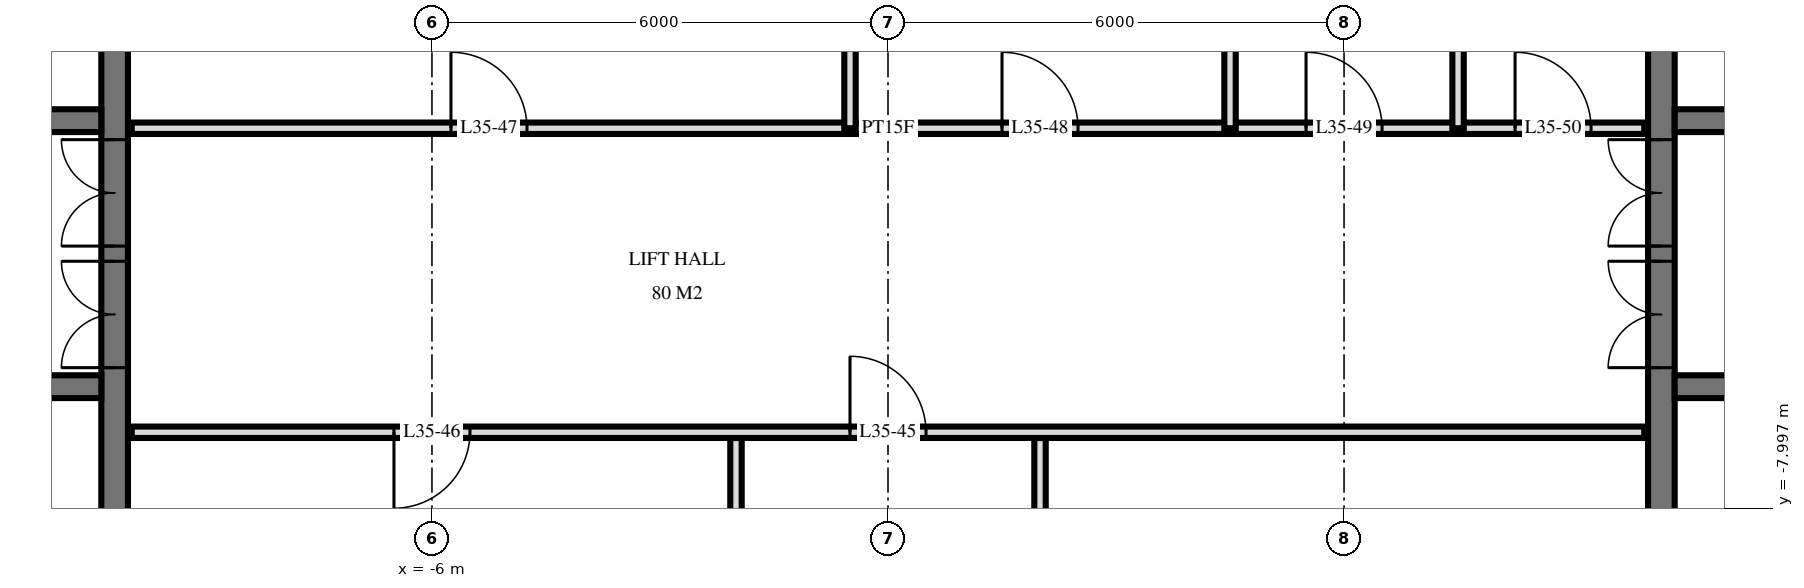
"""IFC4 building model, lengths in metres.
Left out: names, types, materials, properties, quantities, classifications, styles, units other than length and angle.
Written with IfcOpenShell. Run it as: python <this file> out.ifc"""

import sys

from ifc_helpers import new_model, si_unit, direction, frame, frame_2d, origin, place, context, subcontext, project, spatial, rectangle, extrude, element, fill, save


model = new_model("IFC4")
c1 = context("Model", 3, precision=1e-05, world=origin(), true_north=direction((0.0, 1.0)))
c2 = subcontext(c1, "Body", "Model", "MODEL_VIEW")
j1 = project(units=[si_unit("LENGTHUNIT", "METRE"), si_unit("PLANEANGLEUNIT", "RADIAN")], contexts=[c1])
p1 = place(None, origin())
s1 = spatial("IfcSite", under=j1, at=p1, CompositionType="ELEMENT")
p2 = place(p1, origin())
s2 = spatial("IfcBuilding", under=s1, at=p2, CompositionType="ELEMENT")
p3 = place(p2, frame((0.0, 0.0, 138.0)))
s3 = spatial("IfcBuildingStorey", under=s2, at=p3, CompositionType="ELEMENT", Elevation=138.0)
p4 = place(p3, frame((-10.175, -14.55, 0.0), z_axis=(0.0, 0.0, 1.0), x_axis=(0.0, 1.0, 0.0)))
e1 = element("IfcWall", 1, at=p4, inside=s3, PredefinedType="SHEAR", context=c2, shape_type="SweptSolid", body=[
    extrude(rectangle(XDim=14.1, YDim=0.35, at=frame_2d((7.05, 0.0))), origin(), (0.0, 0.0, 1.0), 3.6),
])
p5 = place(p4, frame((8.4, 0.0, 0.0)))
e2 = element("IfcOpeningElement", 2, at=p5, cuts=e1, PredefinedType="OPENING", context=c2, shape_type="SweptSolid", body=[
    extrude(rectangle(XDim=1.4, YDim=2.4, at=frame_2d((0.7, 1.2))), frame((0.0, 0.185, 0.0), z_axis=(0.0, -1.0, 0.0), x_axis=(1.0, 0.0, 0.0)), (0.0, 0.0, 1.0), 0.37),
])
p6 = place(p4, frame((10.0, 0.0, 0.0)))
e3 = element("IfcOpeningElement", 3, at=p6, cuts=e1, PredefinedType="OPENING", context=c2, shape_type="SweptSolid", body=[
    extrude(rectangle(XDim=1.4, YDim=2.4, at=frame_2d((0.7, 1.2))), frame((0.0, 0.185, 0.0), z_axis=(0.0, -1.0, 0.0), x_axis=(1.0, 0.0, 0.0)), (0.0, 0.0, 1.0), 0.37),
])
p7 = place(p4, frame((4.0, 0.0, 0.0)))
e4 = element("IfcOpeningElement", 4, at=p7, cuts=e1, PredefinedType="OPENING", context=c2, shape_type="SweptSolid", body=[
    extrude(rectangle(XDim=1.2, YDim=2.1, at=frame_2d((0.6, 1.05))), frame((0.0, 0.185, 0.0), z_axis=(0.0, -1.0, 0.0), x_axis=(1.0, 0.0, 0.0)), (0.0, 0.0, 1.0), 0.37),
])
p8 = place(p3, frame((-24.05, -2.9, 0.0), z_axis=(0.0, 0.0, 1.0), x_axis=(1.0, 0.0, 0.0)))
e5 = element("IfcWall", 5, at=p8, inside=s3, PredefinedType="SHEAR", context=c2, shape_type="SweptSolid", body=[
    extrude(rectangle(XDim=13.7, YDim=0.3, at=frame_2d((6.85, 0.0))), origin(), (0.0, 0.0, 1.0), 3.6),
])
p9 = place(p8, frame((0.55, 0.0, 0.0)))
e6 = element("IfcOpeningElement", 6, at=p9, cuts=e5, PredefinedType="OPENING", context=c2, shape_type="SweptSolid", body=[
    extrude(rectangle(XDim=1.1, YDim=2.1, at=frame_2d((0.55, 1.05))), frame((0.0, 0.16, 0.0), z_axis=(0.0, -1.0, 0.0), x_axis=(1.0, 0.0, 0.0)), (0.0, 0.0, 1.0), 0.32),
])
p10 = place(p8, frame((5.9, 0.0, 0.0)))
e7 = element("IfcOpeningElement", 7, at=p10, cuts=e5, PredefinedType="OPENING", context=c2, shape_type="SweptSolid", body=[
    extrude(rectangle(XDim=0.9, YDim=2.1, at=frame_2d((0.45, 1.05))), frame((0.0, 0.16, 0.0), z_axis=(0.0, -1.0, 0.0), x_axis=(1.0, 0.0, 0.0)), (0.0, 0.0, 1.0), 0.32),
])
p11 = place(p8, frame((11.85, 0.0, 0.0)))
e8 = element("IfcOpeningElement", 8, at=p11, cuts=e5, PredefinedType="OPENING", context=c2, shape_type="SweptSolid", body=[
    extrude(rectangle(XDim=1.0, YDim=2.1, at=frame_2d((0.5, 1.05))), frame((0.0, 0.16, 0.0), z_axis=(0.0, -1.0, 0.0), x_axis=(1.0, 0.0, 0.0)), (0.0, 0.0, 1.0), 0.32),
])
p12 = place(p8, frame((9.312, 0.0, 0.0)))
e9 = element("IfcOpeningElement", 9, at=p12, cuts=e5, PredefinedType="OPENING", context=c2, shape_type="SweptSolid", body=[
    extrude(rectangle(XDim=1.0, YDim=2.1, at=frame_2d((0.5, 1.05))), frame((0.0, 0.16, 0.0), z_axis=(0.0, -1.0, 0.0), x_axis=(1.0, 0.0, 0.0)), (0.0, 0.0, 1.0), 0.32),
])
p13 = place(p8, frame((7.887, 0.0, 0.0)))
e10 = element("IfcOpeningElement", 10, at=p13, cuts=e5, PredefinedType="OPENING", context=c2, shape_type="SweptSolid", body=[
    extrude(rectangle(XDim=1.0, YDim=2.1, at=frame_2d((0.5, 1.05))), frame((0.0, 0.16, 0.0), z_axis=(0.0, -1.0, 0.0), x_axis=(1.0, 0.0, 0.0)), (0.0, 0.0, 1.0), 0.32),
])
p14 = place(p8, frame((3.0, 0.0, 0.0)))
e11 = element("IfcOpeningElement", 11, at=p14, cuts=e5, PredefinedType="OPENING", context=c2, shape_type="SweptSolid", body=[
    extrude(rectangle(XDim=1.0, YDim=2.1, at=frame_2d((0.5, 1.05))), frame((0.0, 0.16, 0.0), z_axis=(0.0, -1.0, 0.0), x_axis=(1.0, 0.0, 0.0)), (0.0, 0.0, 1.0), 0.32),
])
p15 = place(p3, frame((-24.05, -6.4, 0.0), z_axis=(0.0, 0.0, 1.0), x_axis=(1.0, 0.0, 0.0)))
e12 = element("IfcWall", 12, at=p15, inside=s3, PredefinedType="SHEAR", context=c2, shape_type="SweptSolid", body=[
    extrude(rectangle(XDim=13.7, YDim=0.3, at=frame_2d((6.85, 0.0))), origin(), (0.0, 0.0, 1.0), 3.6),
])
p16 = place(p15, frame((0.55, 0.0, 0.0)))
e13 = element("IfcOpeningElement", 13, at=p16, cuts=e12, PredefinedType="OPENING", context=c2, shape_type="SweptSolid", body=[
    extrude(rectangle(XDim=1.1, YDim=2.1, at=frame_2d((0.55, 1.05))), frame((0.0, 0.16, 0.0), z_axis=(0.0, -1.0, 0.0), x_axis=(1.0, 0.0, 0.0)), (0.0, 0.0, 1.0), 0.32),
])
p17 = place(p15, frame((5.8, 0.0, 0.0)))
e14 = element("IfcOpeningElement", 14, at=p17, cuts=e12, PredefinedType="OPENING", context=c2, shape_type="SweptSolid", body=[
    extrude(rectangle(XDim=1.1, YDim=2.1, at=frame_2d((0.55, 1.05))), frame((0.0, 0.16, 0.0), z_axis=(0.0, -1.0, 0.0), x_axis=(1.0, 0.0, 0.0)), (0.0, 0.0, 1.0), 0.32),
])
p18 = place(p3, frame((10.175, -14.55, 0.0), z_axis=(0.0, 0.0, 1.0), x_axis=(0.0, 1.0, 0.0)))
e15 = element("IfcWall", 15, at=p18, inside=s3, PredefinedType="SHEAR", context=c2, shape_type="SweptSolid", body=[
    extrude(rectangle(XDim=14.1, YDim=0.35, at=frame_2d((7.05, 0.0))), origin(), (0.0, 0.0, 1.0), 3.6),
])
p19 = place(p18, frame((8.4, 0.0, 0.0)))
e16 = element("IfcOpeningElement", 16, at=p19, cuts=e15, PredefinedType="OPENING", context=c2, shape_type="SweptSolid", body=[
    extrude(rectangle(XDim=1.4, YDim=2.4, at=frame_2d((0.7, 1.2))), frame((0.0, 0.185, 0.0), z_axis=(0.0, -1.0, 0.0), x_axis=(1.0, 0.0, 0.0)), (0.0, 0.0, 1.0), 0.37),
])
p20 = place(p18, frame((10.0, 0.0, 0.0)))
e17 = element("IfcOpeningElement", 17, at=p20, cuts=e15, PredefinedType="OPENING", context=c2, shape_type="SweptSolid", body=[
    extrude(rectangle(XDim=1.4, YDim=2.4, at=frame_2d((0.7, 1.2))), frame((0.0, 0.185, 0.0), z_axis=(0.0, -1.0, 0.0), x_axis=(1.0, 0.0, 0.0)), (0.0, 0.0, 1.0), 0.37),
])
p21 = place(p18, frame((4.0, 0.0, 0.0)))
e18 = element("IfcOpeningElement", 18, at=p21, cuts=e15, PredefinedType="OPENING", context=c2, shape_type="SweptSolid", body=[
    extrude(rectangle(XDim=1.2, YDim=2.1, at=frame_2d((0.6, 1.05))), frame((0.0, 0.185, 0.0), z_axis=(0.0, -1.0, 0.0), x_axis=(1.0, 0.0, 0.0)), (0.0, 0.0, 1.0), 0.37),
])
p22 = place(p3, frame((10.35, -2.9, 0.0), z_axis=(0.0, 0.0, 1.0), x_axis=(1.0, 0.0, 0.0)))
e19 = element("IfcWall", 19, at=p22, inside=s3, PredefinedType="SHEAR", context=c2, shape_type="SweptSolid", body=[
    extrude(rectangle(XDim=13.7, YDim=0.3, at=frame_2d((6.85, 0.0))), origin(), (0.0, 0.0, 1.0), 3.6),
])
p23 = place(p22, frame((12.05, 0.0, 0.0)))
e20 = element("IfcOpeningElement", 20, at=p23, cuts=e19, PredefinedType="OPENING", context=c2, shape_type="SweptSolid", body=[
    extrude(rectangle(XDim=1.1, YDim=2.1, at=frame_2d((0.55, 1.05))), frame((0.0, 0.16, 0.0), z_axis=(0.0, -1.0, 0.0), x_axis=(1.0, 0.0, 0.0)), (0.0, 0.0, 1.0), 0.32),
])
p24 = place(p22, frame((6.9, 0.0, 0.0)))
e21 = element("IfcOpeningElement", 21, at=p24, cuts=e19, PredefinedType="OPENING", context=c2, shape_type="SweptSolid", body=[
    extrude(rectangle(XDim=0.9, YDim=2.1, at=frame_2d((0.45, 1.05))), frame((0.0, 0.16, 0.0), z_axis=(0.0, -1.0, 0.0), x_axis=(1.0, 0.0, 0.0)), (0.0, 0.0, 1.0), 0.32),
])
p25 = place(p22, frame((0.85, 0.0, 0.0)))
e22 = element("IfcOpeningElement", 22, at=p25, cuts=e19, PredefinedType="OPENING", context=c2, shape_type="SweptSolid", body=[
    extrude(rectangle(XDim=1.0, YDim=2.1, at=frame_2d((0.5, 1.05))), frame((0.0, 0.16, 0.0), z_axis=(0.0, -1.0, 0.0), x_axis=(1.0, 0.0, 0.0)), (0.0, 0.0, 1.0), 0.32),
])
p26 = place(p22, frame((3.387, 0.0, 0.0)))
e23 = element("IfcOpeningElement", 23, at=p26, cuts=e19, PredefinedType="OPENING", context=c2, shape_type="SweptSolid", body=[
    extrude(rectangle(XDim=1.0, YDim=2.1, at=frame_2d((0.5, 1.05))), frame((0.0, 0.16, 0.0), z_axis=(0.0, -1.0, 0.0), x_axis=(1.0, 0.0, 0.0)), (0.0, 0.0, 1.0), 0.32),
])
p27 = place(p22, frame((4.812, 0.0, 0.0)))
e24 = element("IfcOpeningElement", 24, at=p27, cuts=e19, PredefinedType="OPENING", context=c2, shape_type="SweptSolid", body=[
    extrude(rectangle(XDim=1.0, YDim=2.1, at=frame_2d((0.5, 1.05))), frame((0.0, 0.16, 0.0), z_axis=(0.0, -1.0, 0.0), x_axis=(1.0, 0.0, 0.0)), (0.0, 0.0, 1.0), 0.32),
])
p28 = place(p22, frame((9.7, 0.0, 0.0)))
e25 = element("IfcOpeningElement", 25, at=p28, cuts=e19, PredefinedType="OPENING", context=c2, shape_type="SweptSolid", body=[
    extrude(rectangle(XDim=1.0, YDim=2.1, at=frame_2d((0.5, 1.05))), frame((0.0, 0.16, 0.0), z_axis=(0.0, -1.0, 0.0), x_axis=(1.0, 0.0, 0.0)), (0.0, 0.0, 1.0), 0.32),
])
p29 = place(p3, frame((10.35, -6.4, 0.0), z_axis=(0.0, 0.0, 1.0), x_axis=(1.0, 0.0, 0.0)))
e26 = element("IfcWall", 26, at=p29, inside=s3, PredefinedType="SHEAR", context=c2, shape_type="SweptSolid", body=[
    extrude(rectangle(XDim=13.7, YDim=0.3, at=frame_2d((6.85, 0.0))), origin(), (0.0, 0.0, 1.0), 3.6),
])
p30 = place(p29, frame((12.05, 0.0, 0.0)))
e27 = element("IfcOpeningElement", 27, at=p30, cuts=e26, PredefinedType="OPENING", context=c2, shape_type="SweptSolid", body=[
    extrude(rectangle(XDim=1.1, YDim=2.1, at=frame_2d((0.55, 1.05))), frame((0.0, 0.16, 0.0), z_axis=(0.0, -1.0, 0.0), x_axis=(1.0, 0.0, 0.0)), (0.0, 0.0, 1.0), 0.32),
])
p31 = place(p29, frame((6.8, 0.0, 0.0)))
e28 = element("IfcOpeningElement", 28, at=p31, cuts=e26, PredefinedType="OPENING", context=c2, shape_type="SweptSolid", body=[
    extrude(rectangle(XDim=1.1, YDim=2.1, at=frame_2d((0.55, 1.05))), frame((0.0, 0.16, 0.0), z_axis=(0.0, -1.0, 0.0), x_axis=(1.0, 0.0, 0.0)), (0.0, 0.0, 1.0), 0.32),
])
for number, where, z_axis, x_axis in (
    (29, (7.5, -3.0, 0.0), (0.0, 0.0, 1.0), (0.0, 1.0, 0.0)),
    (30, (4.5, -3.0, 0.0), (0.0, 0.0, 1.0), (0.0, 1.0, 0.0)),
):
    element("IfcWall", number, at=place(p3, frame(where, z_axis=z_axis, x_axis=x_axis)), inside=s3, PredefinedType="PLUMBINGWALL", context=c2, shape_type="SweptSolid", body=[
        extrude(rectangle(XDim=4.02, YDim=0.15, at=frame_2d((2.01, 0.0))), origin(), (0.0, 0.0, 1.0), 3.32),
    ])
p32 = place(p3, frame((2.0, -11.0, 0.0), z_axis=(0.0, 0.0, 1.0), x_axis=(0.0, 1.0, 0.0)))
e31 = element("IfcWall", 31, at=p32, inside=s3, PredefinedType="PARTITIONING", context=c2, shape_type="SweptSolid", body=[
    extrude(rectangle(XDim=4.0, YDim=0.15, at=frame_2d((2.0, 0.0))), origin(), (0.0, 0.0, 1.0), 3.32),
])
p33 = place(p3, frame((-0.5, -3.0, 0.0), z_axis=(0.0, 0.0, 1.0), x_axis=(0.0, 1.0, 0.0)))
e32 = element("IfcWall", 32, at=p33, inside=s3, PredefinedType="PARTITIONING", context=c2, shape_type="SweptSolid", body=[
    extrude(rectangle(XDim=4.02, YDim=0.15, at=frame_2d((2.01, 0.0))), origin(), (0.0, 0.0, 1.0), 3.32),
])
p34 = place(p3, frame((-2.0, -11.0, 0.0), z_axis=(0.0, 0.0, 1.0), x_axis=(0.0, 1.0, 0.0)))
e33 = element("IfcWall", 33, at=p34, inside=s3, PredefinedType="PARTITIONING", context=c2, shape_type="SweptSolid", body=[
    extrude(rectangle(XDim=4.0, YDim=0.15, at=frame_2d((2.0, 0.0))), origin(), (0.0, 0.0, 1.0), 3.32),
])
p35 = place(p3, frame((-9.95, -7.0, 0.0), z_axis=(0.0, 0.0, 1.0), x_axis=(1.0, 0.0, 0.0)))
e34 = element("IfcWall", 34, at=p35, inside=s3, PredefinedType="PARTITIONING", context=c2, shape_type="SweptSolid", body=[
    extrude(rectangle(XDim=19.9, YDim=0.15, at=frame_2d((9.95, 0.0))), origin(), (0.0, 0.0, 1.0), 3.32),
])
p36 = place(p35, frame((9.45, 0.0, 0.0)))
e35 = element("IfcOpeningElement", 35, at=p36, cuts=e34, PredefinedType="OPENING", context=c2, shape_type="SweptSolid", body=[
    extrude(rectangle(XDim=1.0, YDim=2.1, at=frame_2d((0.5, 1.05))), frame((0.0, 0.085, 0.0), z_axis=(0.0, -1.0, 0.0), x_axis=(1.0, 0.0, 0.0)), (0.0, 0.0, 1.0), 0.17),
])
p37 = place(p35, frame((3.45, 0.0, 0.0)))
e36 = element("IfcOpeningElement", 36, at=p37, cuts=e34, PredefinedType="OPENING", context=c2, shape_type="SweptSolid", body=[
    extrude(rectangle(XDim=1.0, YDim=2.1, at=frame_2d((0.5, 1.05))), frame((0.0, 0.085, 0.0), z_axis=(0.0, -1.0, 0.0), x_axis=(1.0, 0.0, 0.0)), (0.0, 0.0, 1.0), 0.17),
])
p38 = place(p3, frame((-9.95, -3.0, 0.0), z_axis=(0.0, 0.0, 1.0), x_axis=(1.0, 0.0, 0.0)))
e37 = element("IfcWall", 37, at=p38, inside=s3, PredefinedType="PARTITIONING", context=c2, shape_type="SweptSolid", body=[
    extrude(rectangle(XDim=19.9, YDim=0.15, at=frame_2d((9.95, 0.0))), origin(), (0.0, 0.0, 1.0), 3.32),
])
p39 = place(p38, frame((4.2, 0.0, 0.0)))
e38 = element("IfcOpeningElement", 38, at=p39, cuts=e37, PredefinedType="OPENING", context=c2, shape_type="SweptSolid", body=[
    extrude(rectangle(XDim=1.0, YDim=2.1, at=frame_2d((0.5, 1.05))), frame((0.0, 0.085, 0.0), z_axis=(0.0, -1.0, 0.0), x_axis=(1.0, 0.0, 0.0)), (0.0, 0.0, 1.0), 0.17),
])
p40 = place(p38, frame((11.45, 0.0, 0.0)))
e39 = element("IfcOpeningElement", 39, at=p40, cuts=e37, PredefinedType="OPENING", context=c2, shape_type="SweptSolid", body=[
    extrude(rectangle(XDim=1.0, YDim=2.1, at=frame_2d((0.5, 1.05))), frame((0.0, 0.085, 0.0), z_axis=(0.0, -1.0, 0.0), x_axis=(1.0, 0.0, 0.0)), (0.0, 0.0, 1.0), 0.17),
])
p41 = place(p38, frame((15.45, 0.0, 0.0)))
e40 = element("IfcOpeningElement", 40, at=p41, cuts=e37, PredefinedType="OPENING", context=c2, shape_type="SweptSolid", body=[
    extrude(rectangle(XDim=1.0, YDim=2.1, at=frame_2d((0.5, 1.05))), frame((0.0, 0.085, 0.0), z_axis=(0.0, -1.0, 0.0), x_axis=(1.0, 0.0, 0.0)), (0.0, 0.0, 1.0), 0.17),
])
p42 = place(p38, frame((18.2, 0.0, 0.0)))
e41 = element("IfcOpeningElement", 41, at=p42, cuts=e37, PredefinedType="OPENING", context=c2, shape_type="SweptSolid", body=[
    extrude(rectangle(XDim=1.0, YDim=2.1, at=frame_2d((0.5, 1.05))), frame((0.0, 0.085, 0.0), z_axis=(0.0, -1.0, 0.0), x_axis=(1.0, 0.0, 0.0)), (0.0, 0.0, 1.0), 0.17),
])
p43 = place(p5, origin())
e42 = element("IfcDoor", 42, at=p43, inside=s3, OperationType="DOUBLE_DOOR_SINGLE_SWING", PredefinedType="DOOR", context=c2, shape_type="SweptSolid", body=[
    extrude(rectangle(XDim=1.4, YDim=2.4, at=frame_2d((0.7, 1.2))), frame((0.0, 0.025, 0.0), z_axis=(0.0, -1.0, 0.0), x_axis=(1.0, 0.0, 0.0)), (0.0, 0.0, 1.0), 0.05),
])
fill(e2, e42)
p44 = place(p6, origin())
e43 = element("IfcDoor", 43, at=p44, inside=s3, OperationType="DOUBLE_DOOR_SINGLE_SWING", PredefinedType="DOOR", context=c2, shape_type="SweptSolid", body=[
    extrude(rectangle(XDim=1.4, YDim=2.4, at=frame_2d((0.7, 1.2))), frame((0.0, 0.025, 0.0), z_axis=(0.0, -1.0, 0.0), x_axis=(1.0, 0.0, 0.0)), (0.0, 0.0, 1.0), 0.05),
])
fill(e3, e43)
p45 = place(p19, origin())
e44 = element("IfcDoor", 44, at=p45, inside=s3, OperationType="DOUBLE_DOOR_SINGLE_SWING", PredefinedType="DOOR", context=c2, shape_type="SweptSolid", body=[
    extrude(rectangle(XDim=1.4, YDim=2.4, at=frame_2d((0.7, 1.2))), frame((0.0, 0.025, 0.0), z_axis=(0.0, -1.0, 0.0), x_axis=(1.0, 0.0, 0.0)), (0.0, 0.0, 1.0), 0.05),
])
fill(e16, e44)
p46 = place(p20, origin())
e45 = element("IfcDoor", 45, at=p46, inside=s3, OperationType="DOUBLE_DOOR_SINGLE_SWING", PredefinedType="DOOR", context=c2, shape_type="SweptSolid", body=[
    extrude(rectangle(XDim=1.4, YDim=2.4, at=frame_2d((0.7, 1.2))), frame((0.0, 0.025, 0.0), z_axis=(0.0, -1.0, 0.0), x_axis=(1.0, 0.0, 0.0)), (0.0, 0.0, 1.0), 0.05),
])
fill(e17, e45)
p47 = place(p36, origin())
e46 = element("IfcDoor", 46, at=p47, inside=s3, OperationType="SINGLE_SWING_RIGHT", PredefinedType="DOOR", context=c2, shape_type="SweptSolid", body=[
    extrude(rectangle(XDim=1.0, YDim=2.1, at=frame_2d((0.5, 1.05))), frame((0.0, 0.025, 0.0), z_axis=(0.0, -1.0, 0.0), x_axis=(1.0, 0.0, 0.0)), (0.0, 0.0, 1.0), 0.05),
])
fill(e35, e46)
p48 = place(p37, frame((0.5, 0.0, 0.0), z_axis=(0.0, 0.0, 1.0), x_axis=(-1.0, 0.0, 0.0)))
e47 = element("IfcDoor", 47, at=p48, inside=s3, OperationType="SINGLE_SWING_LEFT", PredefinedType="DOOR", context=c2, shape_type="SweptSolid", body=[
    extrude(rectangle(XDim=1.0, YDim=2.1, at=frame_2d((0.0, 1.05))), frame((0.0, -0.025, 0.0), z_axis=(0.0, 1.0, 0.0), x_axis=(-1.0, 0.0, 0.0)), (0.0, 0.0, 1.0), 0.05),
])
fill(e36, e47)
p49 = place(p39, origin())
e48 = element("IfcDoor", 48, at=p49, inside=s3, OperationType="SINGLE_SWING_RIGHT", PredefinedType="DOOR", context=c2, shape_type="SweptSolid", body=[
    extrude(rectangle(XDim=1.0, YDim=2.1, at=frame_2d((0.5, 1.05))), frame((0.0, 0.025, 0.0), z_axis=(0.0, -1.0, 0.0), x_axis=(1.0, 0.0, 0.0)), (0.0, 0.0, 1.0), 0.05),
])
fill(e38, e48)
p50 = place(p40, origin())
e49 = element("IfcDoor", 49, at=p50, inside=s3, OperationType="SINGLE_SWING_RIGHT", PredefinedType="DOOR", context=c2, shape_type="SweptSolid", body=[
    extrude(rectangle(XDim=1.0, YDim=2.1, at=frame_2d((0.5, 1.05))), frame((0.0, 0.025, 0.0), z_axis=(0.0, -1.0, 0.0), x_axis=(1.0, 0.0, 0.0)), (0.0, 0.0, 1.0), 0.05),
])
fill(e39, e49)
p51 = place(p41, origin())
e50 = element("IfcDoor", 50, at=p51, inside=s3, OperationType="SINGLE_SWING_RIGHT", PredefinedType="DOOR", context=c2, shape_type="SweptSolid", body=[
    extrude(rectangle(XDim=1.0, YDim=2.1, at=frame_2d((0.5, 1.05))), frame((0.0, 0.025, 0.0), z_axis=(0.0, -1.0, 0.0), x_axis=(1.0, 0.0, 0.0)), (0.0, 0.0, 1.0), 0.05),
])
fill(e40, e50)
p52 = place(p42, origin())
e51 = element("IfcDoor", 51, at=p52, inside=s3, OperationType="SINGLE_SWING_RIGHT", PredefinedType="DOOR", context=c2, shape_type="SweptSolid", body=[
    extrude(rectangle(XDim=1.0, YDim=2.1, at=frame_2d((0.5, 1.05))), frame((0.0, 0.025, 0.0), z_axis=(0.0, -1.0, 0.0), x_axis=(1.0, 0.0, 0.0)), (0.0, 0.0, 1.0), 0.05),
])
fill(e41, e51)
save(model, sys.argv[1])
